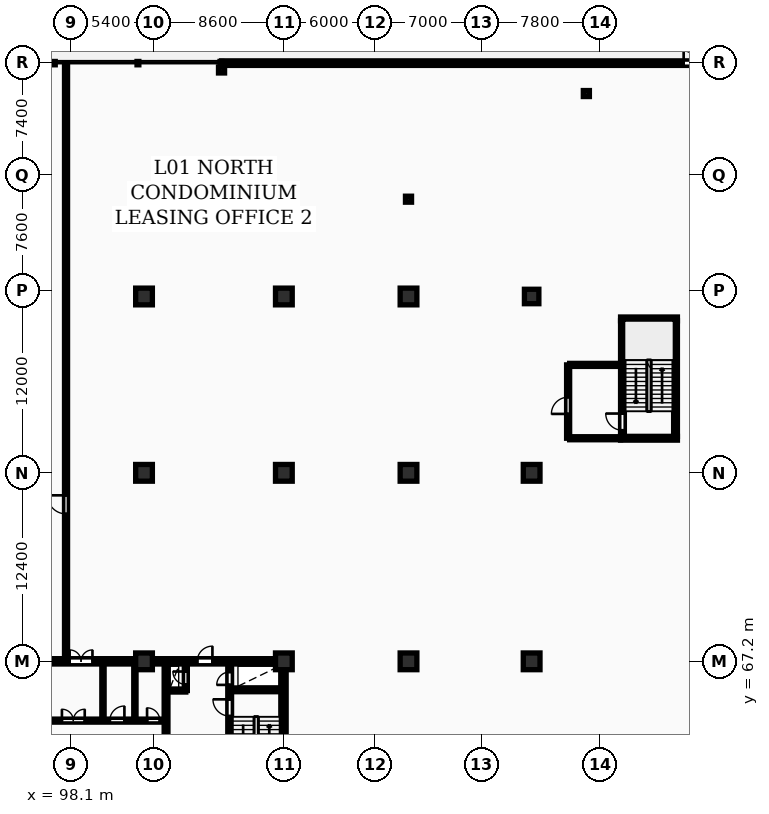
"""IFC4 building model, lengths in metres.
Left out: names, types, materials, properties, quantities, classifications, styles, units other than length and angle.
Written with IfcOpenShell. Run it as: python <this file> out.ifc"""

import sys

from ifc_helpers import new_model, si_unit, direction, frame, frame_2d, origin, origin_2d, place, context, subcontext, project, spatial, rectangle, circle, i_section, extrude, element, fill, save


model = new_model("IFC4")
c1 = context("Model", 3, precision=1e-05, world=origin(), true_north=direction((0.0, 1.0)))
c2 = subcontext(c1, "Body", "Model", "MODEL_VIEW")
j1 = project(units=[si_unit("LENGTHUNIT", "METRE"), si_unit("PLANEANGLEUNIT", "RADIAN")], contexts=[c1])
p1 = place(None, origin())
s1 = spatial("IfcSite", under=j1, at=p1, CompositionType="ELEMENT")
p2 = place(p1, origin())
s2 = spatial("IfcBuilding", under=s1, at=p2, CompositionType="ELEMENT")
p3 = place(p2, frame((0.0, 0.0, 5.4)))
s3 = spatial("IfcBuildingStorey", under=s2, at=p3, CompositionType="ELEMENT", Elevation=5.4)
for number, where, z_axis, x_axis in (
    (1, (102.9, 67.2, 0.0), (0.0, 0.0, 1.0), (1.0, 0.0, 0.0)),
    (2, (102.9, 79.6, 0.0), (0.0, 0.0, 1.0), (1.0, 0.0, 0.0)),
    (3, (102.9, 91.2, 0.0), (0.0, 0.0, 1.0), (1.0, 0.0, 0.0)),
    (4, (112.1, 67.2, 0.0), (0.0, 0.0, 1.0), (1.0, 0.0, 0.0)),
    (5, (112.1, 79.6, 0.0), (0.0, 0.0, 1.0), (1.0, 0.0, 0.0)),
    (6, (112.1, 91.2, 0.0), (0.0, 0.0, 1.0), (1.0, 0.0, 0.0)),
    (7, (120.3, 67.2, 0.0), (0.0, 0.0, 1.0), (1.0, 0.0, 0.0)),
    (8, (120.3, 79.6, 0.0), (0.0, 0.0, 1.0), (1.0, 0.0, 0.0)),
    (9, (120.3, 91.2, 0.0), (0.0, 0.0, 1.0), (1.0, 0.0, 0.0)),
    (10, (128.4, 67.2, 0.0), (0.0, 0.0, 1.0), (1.0, 0.0, 0.0)),
    (11, (128.4, 79.6, 0.0), (0.0, 0.0, 1.0), (1.0, 0.0, 0.0)),
):
    element("IfcColumn", number, at=place(p3, frame(where, z_axis=z_axis, x_axis=x_axis)), inside=s3, PredefinedType="COLUMN", context=c2, shape_type="SweptSolid", body=[
        extrude(rectangle(XDim=1.1, YDim=1.1, at=origin_2d()), origin(), (0.0, 0.0, 1.0), 4.6),
    ])
p4 = place(p3, frame((128.4, 91.2, 0.0), z_axis=(0.0, 0.0, 1.0), x_axis=(1.0, 0.0, 0.0)))
e12 = element("IfcColumn", 12, at=p4, inside=s3, PredefinedType="COLUMN", context=c2, shape_type="SweptSolid", body=[
    extrude(circle(Radius=0.475, at=origin_2d()), origin(), (0.0, 0.0, 1.0), 4.6),
])
p5 = place(p3, frame((120.3, 97.6, 0.0), z_axis=(0.0, 0.0, 1.0), x_axis=(1.0, 0.0, 0.0)))
e13 = element("IfcColumn", 13, at=p5, inside=s3, PredefinedType="COLUMN", context=c2, shape_type="SweptSolid", body=[
    extrude(i_section(OverallWidth=0.399, OverallDepth=0.394, WebThickness=0.023, FlangeThickness=0.037, FilletRadius=0.015, at=origin_2d()), origin(), (0.0, 0.0, 1.0), 4.6),
])
for number, where, z_axis, x_axis in (
    (14, (108.0, 106.1, 0.0), (0.0, 0.0, 1.0), (1.0, 0.0, 0.0)),
    (15, (132.0, 104.55, 0.0), (0.0, 0.0, 1.0), (1.0, 0.0, 0.0)),
):
    element("IfcColumn", number, at=place(p3, frame(where, z_axis=z_axis, x_axis=x_axis)), inside=s3, PredefinedType="COLUMN", context=c2, shape_type="SweptSolid", body=[
        extrude(i_section(OverallWidth=0.399, OverallDepth=0.394, WebThickness=0.023, FlangeThickness=0.037, FilletRadius=0.015, at=origin_2d()), origin(), (0.0, 0.0, 1.0), 4.36),
    ])
p6 = place(p3, frame((150.0, 106.55, 0.0), z_axis=(0.0, 0.0, 1.0), x_axis=(-1.0, 0.0, 0.0)))
e16 = element("IfcWall", 16, at=p6, inside=s3, PredefinedType="STANDARD", context=c2, shape_type="SweptSolid", body=[
    extrude(rectangle(XDim=42.0, YDim=0.3, at=frame_2d((21.0, 0.0))), origin(), (0.0, 0.0, 1.0), 4.3),
])
p7 = place(p6, frame((10.0, 0.0, 0.0)))
e17 = element("IfcOpeningElement", 17, at=p7, cuts=e16, PredefinedType="OPENING", context=c2, shape_type="SweptSolid", body=[
    extrude(rectangle(XDim=1.6, YDim=2.2, at=frame_2d((0.8, 1.1))), frame((0.0, 0.16, 0.0), z_axis=(0.0, -1.0, 0.0), x_axis=(1.0, 0.0, 0.0)), (0.0, 0.0, 1.0), 0.32),
])
p8 = place(p3, frame((112.075, 55.375, 0.0), z_axis=(0.0, 0.0, 1.0), x_axis=(0.0, 1.0, 0.0)))
e18 = element("IfcWall", 18, at=p8, inside=s3, PredefinedType="SHEAR", context=c2, shape_type="SweptSolid", body=[
    extrude(rectangle(XDim=11.65, YDim=0.35, at=frame_2d((5.825, 0.0))), origin(), (0.0, 0.0, 1.0), 4.6),
])
p9 = place(p3, frame((75.95, 67.2, 0.0), z_axis=(0.0, 0.0, 1.0), x_axis=(1.0, 0.0, 0.0)))
e19 = element("IfcWall", 19, at=p9, inside=s3, PredefinedType="SHEAR", context=c2, shape_type="SweptSolid", body=[
    extrude(rectangle(XDim=36.3, YDim=0.35, at=frame_2d((18.15, 0.0))), origin(), (0.0, 0.0, 1.0), 4.6),
])
p10 = place(p9, frame((5.25, 0.0, 0.0)))
e20 = element("IfcOpeningElement", 20, at=p10, cuts=e19, PredefinedType="OPENING", context=c2, shape_type="SweptSolid", body=[
    extrude(rectangle(XDim=1.0, YDim=2.15, at=frame_2d((0.5, 1.075))), frame((0.0, 0.185, 0.0), z_axis=(0.0, -1.0, 0.0), x_axis=(1.0, 0.0, 0.0)), (0.0, 0.0, 1.0), 0.37),
])
p11 = place(p9, frame((22.058, 0.0, 0.0)))
e21 = element("IfcOpeningElement", 21, at=p11, cuts=e19, PredefinedType="OPENING", context=c2, shape_type="SweptSolid", body=[
    extrude(rectangle(XDim=1.5, YDim=2.2, at=frame_2d((0.75, 1.1))), frame((0.0, 0.185, 0.0), z_axis=(0.0, -1.0, 0.0), x_axis=(1.0, 0.0, 0.0)), (0.0, 0.0, 1.0), 0.37),
])
p12 = place(p9, frame((30.45, 0.0, 0.0)))
e22 = element("IfcOpeningElement", 22, at=p12, cuts=e19, PredefinedType="OPENING", context=c2, shape_type="SweptSolid", body=[
    extrude(rectangle(XDim=1.0, YDim=2.15, at=frame_2d((0.5, 1.075))), frame((0.0, 0.185, 0.0), z_axis=(0.0, -1.0, 0.0), x_axis=(1.0, 0.0, 0.0)), (0.0, 0.0, 1.0), 0.37),
])
for number, where, z_axis, x_axis in (
    (23, (102.3, 63.4, 0.0), (0.0, 0.0, 1.0), (0.0, 1.0, 0.0)),
    (24, (100.2, 63.4, 0.0), (0.0, 0.0, 1.0), (0.0, 1.0, 0.0)),
):
    element("IfcWall", number, at=place(p3, frame(where, z_axis=z_axis, x_axis=x_axis)), inside=s3, PredefinedType="PARTITIONING", context=c2, shape_type="SweptSolid", body=[
        extrude(rectangle(XDim=3.6, YDim=0.15, at=frame_2d((1.8, 0.0))), origin(), (0.0, 0.0, 1.0), 4.3),
    ])
p13 = place(p3, frame((84.42, 63.3, 0.0), z_axis=(0.0, 0.0, 1.0), x_axis=(1.0, 0.0, 0.0)))
e25 = element("IfcWall", 25, at=p13, inside=s3, PredefinedType="PARTITIONING", context=c2, shape_type="SweptSolid", body=[
    extrude(rectangle(XDim=19.83, YDim=0.2, at=frame_2d((9.915, 0.0))), origin(), (0.0, 0.0, 1.0), 4.3),
])
p14 = place(p13, frame((1.15, 0.0, 0.0)))
e26 = element("IfcOpeningElement", 26, at=p14, cuts=e25, PredefinedType="OPENING", context=c2, shape_type="SweptSolid", body=[
    extrude(rectangle(XDim=0.85, YDim=2.05, at=frame_2d((0.425, 1.025))), frame((0.0, 0.11, 0.0), z_axis=(0.0, -1.0, 0.0), x_axis=(1.0, 0.0, 0.0)), (0.0, 0.0, 1.0), 0.22),
])
p15 = place(p13, frame((3.25, 0.0, 0.0)))
e27 = element("IfcOpeningElement", 27, at=p15, cuts=e25, PredefinedType="OPENING", context=c2, shape_type="SweptSolid", body=[
    extrude(rectangle(XDim=0.85, YDim=2.05, at=frame_2d((0.425, 1.025))), frame((0.0, 0.11, 0.0), z_axis=(0.0, -1.0, 0.0), x_axis=(1.0, 0.0, 0.0)), (0.0, 0.0, 1.0), 0.22),
])
p16 = place(p13, frame((13.08, 0.0, 0.0)))
e28 = element("IfcOpeningElement", 28, at=p16, cuts=e25, PredefinedType="OPENING", context=c2, shape_type="SweptSolid", body=[
    extrude(rectangle(XDim=1.5, YDim=2.2, at=frame_2d((0.75, 1.1))), frame((0.0, 0.11, 0.0), z_axis=(0.0, -1.0, 0.0), x_axis=(1.0, 0.0, 0.0)), (0.0, 0.0, 1.0), 0.22),
])
p17 = place(p13, frame((5.53, 0.0, 0.0)))
e29 = element("IfcOpeningElement", 29, at=p17, cuts=e25, PredefinedType="OPENING", context=c2, shape_type="SweptSolid", body=[
    extrude(rectangle(XDim=0.88, YDim=2.06, at=frame_2d((0.44, 1.03))), frame((0.0, 0.11, 0.0), z_axis=(0.0, -1.0, 0.0), x_axis=(1.0, 0.0, 0.0)), (0.0, 0.0, 1.0), 0.22),
])
p18 = place(p13, frame((7.68, 0.0, 0.0)))
e30 = element("IfcOpeningElement", 30, at=p18, cuts=e25, PredefinedType="OPENING", context=c2, shape_type="SweptSolid", body=[
    extrude(rectangle(XDim=0.88, YDim=2.06, at=frame_2d((0.44, 1.03))), frame((0.0, 0.11, 0.0), z_axis=(0.0, -1.0, 0.0), x_axis=(1.0, 0.0, 0.0)), (0.0, 0.0, 1.0), 0.22),
])
p19 = place(p13, frame((10.43, 0.0, 0.0)))
e31 = element("IfcOpeningElement", 31, at=p19, cuts=e25, PredefinedType="OPENING", context=c2, shape_type="SweptSolid", body=[
    extrude(rectangle(XDim=0.85, YDim=2.05, at=frame_2d((0.425, 1.025))), frame((0.0, 0.11, 0.0), z_axis=(0.0, -1.0, 0.0), x_axis=(1.0, 0.0, 0.0)), (0.0, 0.0, 1.0), 0.22),
])
p20 = place(p13, frame((16.23, 0.0, 0.0)))
e32 = element("IfcOpeningElement", 32, at=p20, cuts=e25, PredefinedType="OPENING", context=c2, shape_type="SweptSolid", body=[
    extrude(rectangle(XDim=0.96, YDim=2.1, at=frame_2d((0.48, 1.05))), frame((0.0, 0.11, 0.0), z_axis=(0.0, -1.0, 0.0), x_axis=(1.0, 0.0, 0.0)), (0.0, 0.0, 1.0), 0.22),
])
p21 = place(p13, frame((18.68, 0.0, 0.0)))
e33 = element("IfcOpeningElement", 33, at=p21, cuts=e25, PredefinedType="OPENING", context=c2, shape_type="SweptSolid", body=[
    extrude(rectangle(XDim=0.84, YDim=2.04, at=frame_2d((0.42, 1.02))), frame((0.0, 0.11, 0.0), z_axis=(0.0, -1.0, 0.0), x_axis=(1.0, 0.0, 0.0)), (0.0, 0.0, 1.0), 0.22),
])
p22 = place(p3, frame((104.45, 65.28, 0.0), z_axis=(0.0, 0.0, 1.0), x_axis=(1.0, 0.0, 0.0)))
e34 = element("IfcWall", 34, at=p22, inside=s3, PredefinedType="PARTITIONING", context=c2, shape_type="SweptSolid", body=[
    extrude(rectangle(XDim=1.2, YDim=0.2, at=frame_2d((0.6, 0.0))), origin(), (0.0, 0.0, 1.0), 4.3),
])
p23 = place(p3, frame((105.65, 65.28, 0.0), z_axis=(0.0, 0.0, 1.0), x_axis=(0.0, 1.0, 0.0)))
e35 = element("IfcWall", 35, at=p23, inside=s3, PredefinedType="PARTITIONING", context=c2, shape_type="SweptSolid", body=[
    extrude(rectangle(XDim=1.72, YDim=0.2, at=frame_2d((0.86, 0.0))), origin(), (0.0, 0.0, 1.0), 4.3),
])
p24 = place(p23, frame((0.4, 0.0, 0.0)))
e36 = element("IfcOpeningElement", 36, at=p24, cuts=e35, PredefinedType="OPENING", context=c2, shape_type="SweptSolid", body=[
    extrude(rectangle(XDim=0.85, YDim=2.05, at=frame_2d((0.425, 1.025))), frame((0.0, 0.11, 0.0), z_axis=(0.0, -1.0, 0.0), x_axis=(1.0, 0.0, 0.0)), (0.0, 0.0, 1.0), 0.22),
])
p25 = place(p3, frame((104.35, 58.4, 0.0), z_axis=(0.0, 0.0, 1.0), x_axis=(0.0, 1.0, 0.0)))
e37 = element("IfcWall", 37, at=p25, inside=s3, PredefinedType="SHEAR", context=c2, shape_type="SweptSolid", body=[
    extrude(rectangle(XDim=8.6, YDim=0.25, at=frame_2d((4.3, 0.0))), origin(), (0.0, 0.0, 1.0), 4.6),
])
p26 = place(p25, frame((1.8, 0.0, 0.0)))
e38 = element("IfcOpeningElement", 38, at=p26, cuts=e37, PredefinedType="OPENING", context=c2, shape_type="SweptSolid", body=[
    extrude(rectangle(XDim=1.1, YDim=2.1, at=frame_2d((0.55, 1.05))), frame((0.0, 0.135, 0.0), z_axis=(0.0, -1.0, 0.0), x_axis=(1.0, 0.0, 0.0)), (0.0, 0.0, 1.0), 0.27),
])
p27 = place(p3, frame((108.535, 55.4, 0.0), z_axis=(0.0, 0.0, 1.0), x_axis=(0.0, 1.0, 0.0)))
e39 = element("IfcWall", 39, at=p27, inside=s3, PredefinedType="SHEAR", context=c2, shape_type="SweptSolid", body=[
    extrude(rectangle(XDim=11.6, YDim=0.25, at=frame_2d((5.8, 0.0))), origin(), (0.0, 0.0, 1.0), 4.6),
])
p28 = place(p27, frame((8.2, 0.0, 0.0)))
e40 = element("IfcOpeningElement", 40, at=p28, cuts=e39, PredefinedType="OPENING", context=c2, shape_type="SweptSolid", body=[
    extrude(rectangle(XDim=1.1, YDim=2.1, at=frame_2d((0.55, 1.05))), frame((0.0, 0.135, 0.0), z_axis=(0.0, -1.0, 0.0), x_axis=(1.0, 0.0, 0.0)), (0.0, 0.0, 1.0), 0.27),
])
p29 = place(p27, frame((10.25, 0.0, 0.0)))
e41 = element("IfcOpeningElement", 41, at=p29, cuts=e39, PredefinedType="OPENING", context=c2, shape_type="SweptSolid", body=[
    extrude(rectangle(XDim=0.85, YDim=2.05, at=frame_2d((0.425, 1.025))), frame((0.0, 0.135, 0.0), z_axis=(0.0, -1.0, 0.0), x_axis=(1.0, 0.0, 0.0)), (0.0, 0.0, 1.0), 0.27),
])
p30 = place(p3, frame((108.66, 65.325, 0.0), z_axis=(0.0, 0.0, 1.0), x_axis=(1.0, 0.0, 0.0)))
e42 = element("IfcWall", 42, at=p30, inside=s3, PredefinedType="SHEAR", context=c2, shape_type="SweptSolid", body=[
    extrude(rectangle(XDim=3.24, YDim=0.25, at=frame_2d((1.62, 0.0))), origin(), (0.0, 0.0, 1.0), 4.6),
])
p31 = place(p3, frame((134.375, 82.0, 0.0), z_axis=(0.0, 0.0, 1.0), x_axis=(0.0, 1.0, 0.0)))
e43 = element("IfcWall", 43, at=p31, inside=s3, PredefinedType="SHEAR", context=c2, shape_type="SweptSolid", body=[
    extrude(rectangle(XDim=7.6, YDim=0.25, at=frame_2d((3.8, 0.0))), origin(), (0.0, 0.0, 1.0), 4.6),
])
p32 = place(p31, frame((0.4, 0.0, 0.0)))
e44 = element("IfcOpeningElement", 44, at=p32, cuts=e43, PredefinedType="OPENING", context=c2, shape_type="SweptSolid", body=[
    extrude(rectangle(XDim=1.1, YDim=2.1, at=frame_2d((0.55, 1.05))), frame((0.0, 0.135, 0.0), z_axis=(0.0, -1.0, 0.0), x_axis=(1.0, 0.0, 0.0)), (0.0, 0.0, 1.0), 0.27),
])
p33 = place(p3, frame((137.865, 82.0, 0.0), z_axis=(0.0, 0.0, 1.0), x_axis=(0.0, 1.0, 0.0)))
e45 = element("IfcWall", 45, at=p33, inside=s3, PredefinedType="SHEAR", context=c2, shape_type="SweptSolid", body=[
    extrude(rectangle(XDim=7.6, YDim=0.25, at=frame_2d((3.8, 0.0))), origin(), (0.0, 0.0, 1.0), 4.6),
])
for number, where, z_axis, x_axis in (
    (46, (134.25, 81.875, 0.0), (0.0, 0.0, 1.0), (1.0, 0.0, 0.0)),
    (47, (134.25, 89.725, 0.0), (0.0, 0.0, 1.0), (1.0, 0.0, 0.0)),
):
    element("IfcWall", number, at=place(p3, frame(where, z_axis=z_axis, x_axis=x_axis)), inside=s3, PredefinedType="SHEAR", context=c2, shape_type="SweptSolid", body=[
        extrude(rectangle(XDim=3.74, YDim=0.25, at=frame_2d((1.87, 0.0))), origin(), (0.0, 0.0, 1.0), 4.6),
    ])
p34 = place(p3, frame((130.8, 81.875, 0.0), z_axis=(0.0, 0.0, 1.0), x_axis=(0.0, 1.0, 0.0)))
e48 = element("IfcWall", 48, at=p34, inside=s3, PredefinedType="PARTITIONING", context=c2, shape_type="SweptSolid", body=[
    extrude(rectangle(XDim=4.825, YDim=0.2, at=frame_2d((2.413, 0.0))), origin(), (0.0, 0.0, 1.0), 4.3),
])
p35 = place(p34, frame((1.6, 0.0, 0.0)))
e49 = element("IfcOpeningElement", 49, at=p35, cuts=e48, PredefinedType="OPENING", context=c2, shape_type="SweptSolid", body=[
    extrude(rectangle(XDim=1.1, YDim=2.15, at=frame_2d((0.55, 1.075))), frame((0.0, 0.11, 0.0), z_axis=(0.0, -1.0, 0.0), x_axis=(1.0, 0.0, 0.0)), (0.0, 0.0, 1.0), 0.22),
])
for number, where, z_axis, x_axis in (
    (50, (130.9, 81.875, 0.0), (0.0, 0.0, 1.0), (1.0, 0.0, 0.0)),
    (51, (130.9, 86.7, 0.0), (0.0, 0.0, 1.0), (1.0, 0.0, 0.0)),
):
    element("IfcWall", number, at=place(p3, frame(where, z_axis=z_axis, x_axis=x_axis)), inside=s3, PredefinedType="PARTITIONING", context=c2, shape_type="SweptSolid", body=[
        extrude(rectangle(XDim=3.35, YDim=0.2, at=frame_2d((1.675, 0.0))), origin(), (0.0, 0.0, 1.0), 4.3),
    ])
p36 = place(p3, frame((97.77, 67.4, 0.0), z_axis=(0.0, 0.0, 1.0), x_axis=(0.0, 1.0, 0.0)))
e52 = element("IfcWall", 52, at=p36, inside=s3, PredefinedType="PARTITIONING", context=c2, shape_type="SweptSolid", body=[
    extrude(rectangle(XDim=39.12, YDim=0.2, at=frame_2d((19.56, 0.0))), origin(), (0.0, 0.0, 1.0), 4.3),
])
p37 = place(p36, frame((9.5, 0.0, 0.0)))
e53 = element("IfcOpeningElement", 53, at=p37, cuts=e52, PredefinedType="OPENING", context=c2, shape_type="SweptSolid", body=[
    extrude(rectangle(XDim=1.22, YDim=2.18, at=frame_2d((0.61, 1.09))), frame((0.0, 0.11, 0.0), z_axis=(0.0, -1.0, 0.0), x_axis=(1.0, 0.0, 0.0)), (0.0, 0.0, 1.0), 0.22),
])
p38 = place(p7, frame((1.6, 0.0, 0.0), z_axis=(0.0, 0.0, 1.0), x_axis=(-1.0, 0.0, 0.0)))
e54 = element("IfcDoor", 54, at=p38, inside=s3, OperationType="DOUBLE_DOOR_SINGLE_SWING", PredefinedType="DOOR", context=c2, shape_type="SweptSolid", body=[
    extrude(rectangle(XDim=1.6, YDim=2.2, at=frame_2d((0.8, 1.1))), frame((0.0, 0.025, 0.0), z_axis=(0.0, -1.0, 0.0), x_axis=(1.0, 0.0, 0.0)), (0.0, 0.0, 1.0), 0.05),
])
fill(e17, e54)
p39 = place(p11, origin())
e55 = element("IfcDoor", 55, at=p39, inside=s3, OperationType="DOUBLE_DOOR_SINGLE_SWING", PredefinedType="DOOR", context=c2, shape_type="SweptSolid", body=[
    extrude(rectangle(XDim=1.5, YDim=2.2, at=frame_2d((0.75, 1.1))), frame((0.0, 0.025, 0.0), z_axis=(0.0, -1.0, 0.0), x_axis=(1.0, 0.0, 0.0)), (0.0, 0.0, 1.0), 0.05),
])
fill(e21, e55)
p40 = place(p12, origin())
e56 = element("IfcDoor", 56, at=p40, inside=s3, OperationType="SINGLE_SWING_RIGHT", PredefinedType="DOOR", context=c2, shape_type="SweptSolid", body=[
    extrude(rectangle(XDim=1.0, YDim=2.15, at=frame_2d((0.5, 1.075))), frame((0.0, 0.025, 0.0), z_axis=(0.0, -1.0, 0.0), x_axis=(1.0, 0.0, 0.0)), (0.0, 0.0, 1.0), 0.05),
])
fill(e22, e56)
p41 = place(p16, origin())
e57 = element("IfcDoor", 57, at=p41, inside=s3, OperationType="DOUBLE_DOOR_SINGLE_SWING", PredefinedType="DOOR", context=c2, shape_type="SweptSolid", body=[
    extrude(rectangle(XDim=1.5, YDim=2.2, at=frame_2d((0.75, 1.1))), frame((0.0, 0.025, 0.0), z_axis=(0.0, -1.0, 0.0), x_axis=(1.0, 0.0, 0.0)), (0.0, 0.0, 1.0), 0.05),
])
fill(e28, e57)
p42 = place(p20, origin())
e58 = element("IfcDoor", 58, at=p42, inside=s3, OperationType="SINGLE_SWING_RIGHT", PredefinedType="DOOR", context=c2, shape_type="SweptSolid", body=[
    extrude(rectangle(XDim=0.96, YDim=2.1, at=frame_2d((0.48, 1.05))), frame((0.0, 0.025, 0.0), z_axis=(0.0, -1.0, 0.0), x_axis=(1.0, 0.0, 0.0)), (0.0, 0.0, 1.0), 0.05),
])
fill(e32, e58)
p43 = place(p21, origin())
e59 = element("IfcDoor", 59, at=p43, inside=s3, OperationType="SINGLE_SWING_LEFT", PredefinedType="DOOR", context=c2, shape_type="SweptSolid", body=[
    extrude(rectangle(XDim=0.84, YDim=2.04, at=frame_2d((0.42, 1.02))), frame((0.0, 0.025, 0.0), z_axis=(0.0, -1.0, 0.0), x_axis=(1.0, 0.0, 0.0)), (0.0, 0.0, 1.0), 0.05),
])
fill(e33, e59)
p44 = place(p24, origin())
e60 = element("IfcDoor", 60, at=p44, inside=s3, OperationType="SINGLE_SWING_RIGHT", PredefinedType="DOOR", context=c2, shape_type="SweptSolid", body=[
    extrude(rectangle(XDim=0.85, YDim=2.05, at=frame_2d((0.425, 1.025))), frame((0.0, 0.025, 0.0), z_axis=(0.0, -1.0, 0.0), x_axis=(1.0, 0.0, 0.0)), (0.0, 0.0, 1.0), 0.05),
])
fill(e36, e60)
p45 = place(p28, origin())
e61 = element("IfcDoor", 61, at=p45, inside=s3, OperationType="SINGLE_SWING_RIGHT", PredefinedType="DOOR", context=c2, shape_type="SweptSolid", body=[
    extrude(rectangle(XDim=1.1, YDim=2.1, at=frame_2d((0.55, 1.05))), frame((0.0, 0.025, 0.0), z_axis=(0.0, -1.0, 0.0), x_axis=(1.0, 0.0, 0.0)), (0.0, 0.0, 1.0), 0.05),
])
fill(e40, e61)
p46 = place(p29, origin())
e62 = element("IfcDoor", 62, at=p46, inside=s3, OperationType="SINGLE_SWING_LEFT", PredefinedType="DOOR", context=c2, shape_type="SweptSolid", body=[
    extrude(rectangle(XDim=0.85, YDim=2.05, at=frame_2d((0.425, 1.025))), frame((0.0, 0.025, 0.0), z_axis=(0.0, -1.0, 0.0), x_axis=(1.0, 0.0, 0.0)), (0.0, 0.0, 1.0), 0.05),
])
fill(e41, e62)
p47 = place(p32, origin())
e63 = element("IfcDoor", 63, at=p47, inside=s3, OperationType="SINGLE_SWING_RIGHT", PredefinedType="DOOR", context=c2, shape_type="SweptSolid", body=[
    extrude(rectangle(XDim=1.1, YDim=2.1, at=frame_2d((0.55, 1.05))), frame((0.0, 0.025, 0.0), z_axis=(0.0, -1.0, 0.0), x_axis=(1.0, 0.0, 0.0)), (0.0, 0.0, 1.0), 0.05),
])
fill(e44, e63)
p48 = place(p35, origin())
e64 = element("IfcDoor", 64, at=p48, inside=s3, OperationType="SINGLE_SWING_LEFT", PredefinedType="DOOR", context=c2, shape_type="SweptSolid", body=[
    extrude(rectangle(XDim=1.1, YDim=2.15, at=frame_2d((0.55, 1.075))), frame((0.0, 0.025, 0.0), z_axis=(0.0, -1.0, 0.0), x_axis=(1.0, 0.0, 0.0)), (0.0, 0.0, 1.0), 0.05),
])
fill(e49, e64)
p49 = place(p37, origin())
e65 = element("IfcDoor", 65, at=p49, inside=s3, OperationType="SINGLE_SWING_RIGHT", PredefinedType="DOOR", context=c2, shape_type="SweptSolid", body=[
    extrude(rectangle(XDim=1.22, YDim=2.18, at=frame_2d((0.61, 1.09))), frame((0.0, 0.025, 0.0), z_axis=(0.0, -1.0, 0.0), x_axis=(1.0, 0.0, 0.0)), (0.0, 0.0, 1.0), 0.05),
])
fill(e53, e65)
save(model, sys.argv[1])
